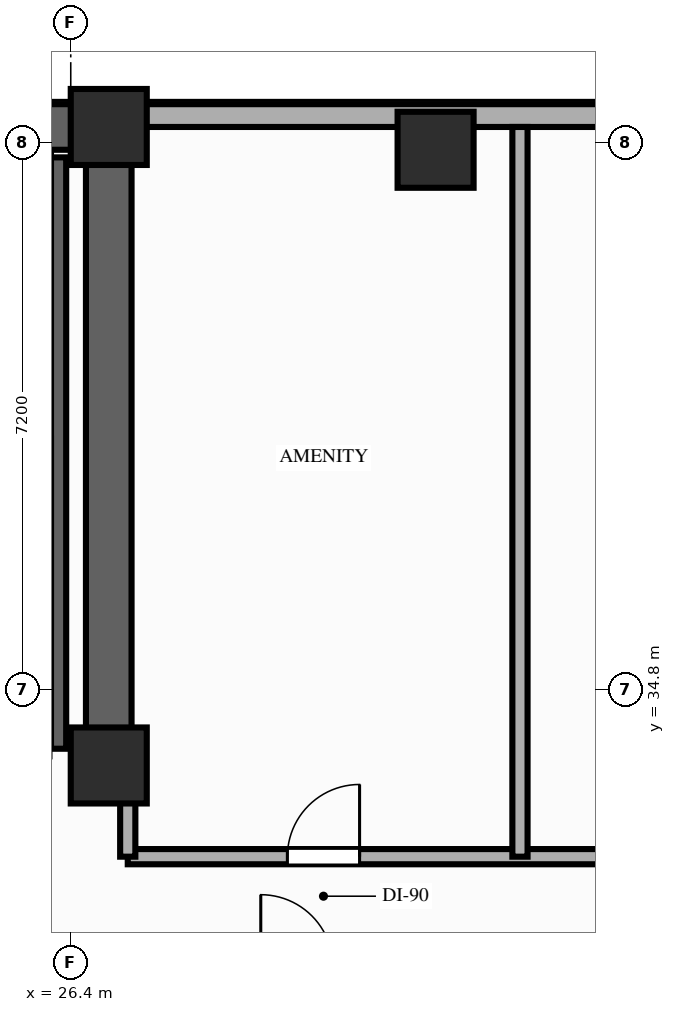
"""IFC4 building model, lengths in metres.
Left out: names, types, materials, properties, quantities, classifications, styles, units other than length and angle.
Written with IfcOpenShell. Run it as: python <this file> out.ifc"""

import sys

from ifc_helpers import new_model, si_unit, direction, frame, frame_2d, origin, origin_2d, place, context, subcontext, project, spatial, rectangle, extrude, element, fill, save


model = new_model("IFC4")
c1 = context("Model", 3, precision=1e-05, world=origin(), true_north=direction((0.0, 1.0)))
c2 = subcontext(c1, "Body", "Model", "MODEL_VIEW")
j1 = project(units=[si_unit("LENGTHUNIT", "METRE"), si_unit("PLANEANGLEUNIT", "RADIAN")], contexts=[c1])
p1 = place(None, origin())
s1 = spatial("IfcSite", under=j1, at=p1, CompositionType="ELEMENT")
p2 = place(p1, origin())
s2 = spatial("IfcBuilding", under=s1, at=p2, CompositionType="ELEMENT")
p3 = place(p2, frame((0.0, 0.0, 123.4)))
s3 = spatial("IfcBuildingStorey", under=s2, at=p3, CompositionType="ELEMENT", Elevation=123.4)
for number, where, z_axis, x_axis in (
    (1, (26.9, 33.8, 0.0), (0.0, 0.0, 1.0), (1.0, 0.0, 0.0)),
    (2, (26.9, 42.2, 0.0), (0.0, 0.0, 1.0), (1.0, 0.0, 0.0)),
    (3, (31.2, 41.9, 0.0), (0.0, 0.0, 1.0), (1.0, 0.0, 0.0)),
):
    element("IfcColumn", number, at=place(p3, frame(where, z_axis=z_axis, x_axis=x_axis)), inside=s3, PredefinedType="COLUMN", context=c2, shape_type="SweptSolid", body=[
        extrude(rectangle(XDim=1.0, YDim=1.0, at=origin_2d()), origin(), (0.0, 0.0, 1.0), 3.2),
    ])
p4 = place(p3, frame((46.4, 42.35, 0.0), z_axis=(0.0, 0.0, 1.0), x_axis=(-1.0, 0.0, 0.0)))
e4 = element("IfcWall", 4, at=p4, inside=s3, PredefinedType="STANDARD", context=c2, shape_type="SweptSolid", body=[
    extrude(rectangle(XDim=19.05, YDim=0.3, at=frame_2d((9.525, 0.0))), origin(), (0.0, 0.0, 1.0), 2.45),
])
p5 = place(p4, frame((8.79, 0.0, 0.85)))
e5 = element("IfcOpeningElement", 5, at=p5, cuts=e4, PredefinedType="OPENING", context=c2, shape_type="SweptSolid", body=[
    extrude(rectangle(XDim=1.8, YDim=1.35, at=frame_2d((0.9, 0.675))), frame((0.0, 0.16, 0.0), z_axis=(0.0, -1.0, 0.0), x_axis=(1.0, 0.0, 0.0)), (0.0, 0.0, 1.0), 0.32),
])
p6 = place(p3, frame((6.45, 42.2, 0.0), z_axis=(0.0, 0.0, 1.0), x_axis=(1.0, 0.0, 0.0)))
e6 = element("IfcWall", 6, at=p6, inside=s3, PredefinedType="SHEAR", context=c2, shape_type="SweptSolid", body=[
    extrude(rectangle(XDim=20.45, YDim=0.6, at=frame_2d((10.225, 0.0))), origin(), (0.0, 0.0, 1.0), 3.02),
])
p7 = place(p3, frame((26.9, 33.8, 0.0), z_axis=(0.0, 0.0, 1.0), x_axis=(0.0, 1.0, 0.0)))
e7 = element("IfcWall", 7, at=p7, inside=s3, PredefinedType="SHEAR", context=c2, shape_type="SweptSolid", body=[
    extrude(rectangle(XDim=7.95, YDim=0.6, at=frame_2d((3.975, 0.0))), origin(), (0.0, 0.0, 1.0), 3.02),
])
p8 = place(p3, frame((26.24, 34.02, 0.0), z_axis=(0.0, 0.0, 1.0), x_axis=(0.0, 1.0, 0.0)))
e8 = element("IfcWall", 8, at=p8, inside=s3, PredefinedType="SHEAR", context=c2, shape_type="SweptSolid", body=[
    extrude(rectangle(XDim=7.78, YDim=0.2, at=frame_2d((3.89, 0.0))), origin(), (0.0, 0.0, 1.0), 3.02),
])
p9 = place(p3, frame((27.15, 32.6, 0.0), z_axis=(0.0, 0.0, 1.0), x_axis=(1.0, 0.0, 0.0)))
e9 = element("IfcWall", 9, at=p9, inside=s3, PredefinedType="PARTITIONING", context=c2, shape_type="SweptSolid", body=[
    extrude(rectangle(XDim=13.95, YDim=0.2, at=frame_2d((6.975, 0.0))), origin(), (0.0, 0.0, 1.0), 2.45),
])
p10 = place(p9, frame((2.1, 0.0, 0.0)))
e10 = element("IfcOpeningElement", 10, at=p10, cuts=e9, PredefinedType="OPENING", context=c2, shape_type="SweptSolid", body=[
    extrude(rectangle(XDim=0.95, YDim=2.15, at=frame_2d((0.475, 1.075))), frame((0.0, 0.11, 0.0), z_axis=(0.0, -1.0, 0.0), x_axis=(1.0, 0.0, 0.0)), (0.0, 0.0, 1.0), 0.22),
])
p11 = place(p9, frame((9.07, 0.0, 0.0)))
e11 = element("IfcOpeningElement", 11, at=p11, cuts=e9, PredefinedType="OPENING", context=c2, shape_type="SweptSolid", body=[
    extrude(rectangle(XDim=0.95, YDim=2.15, at=frame_2d((0.475, 1.075))), frame((0.0, 0.11, 0.0), z_axis=(0.0, -1.0, 0.0), x_axis=(1.0, 0.0, 0.0)), (0.0, 0.0, 1.0), 0.22),
])
p12 = place(p3, frame((27.15, 32.6, 0.0), z_axis=(0.0, 0.0, 1.0), x_axis=(0.0, 1.0, 0.0)))
e12 = element("IfcWall", 12, at=p12, inside=s3, PredefinedType="PARTITIONING", context=c2, shape_type="SweptSolid", body=[
    extrude(rectangle(XDim=1.08, YDim=0.2, at=frame_2d((0.54, 0.0))), origin(), (0.0, 0.0, 1.0), 2.45),
])
p13 = place(p3, frame((32.31, 32.6, 0.0), z_axis=(0.0, 0.0, 1.0), x_axis=(0.0, 1.0, 0.0)))
e13 = element("IfcWall", 13, at=p13, inside=s3, PredefinedType="PARTITIONING", context=c2, shape_type="SweptSolid", body=[
    extrude(rectangle(XDim=9.6, YDim=0.2, at=frame_2d((4.8, 0.0))), origin(), (0.0, 0.0, 1.0), 2.45),
])
p14 = place(p10, origin())
e14 = element("IfcDoor", 14, at=p14, inside=s3, OperationType="SINGLE_SWING_RIGHT", PredefinedType="DOOR", context=c2, shape_type="SweptSolid", body=[
    extrude(rectangle(XDim=0.95, YDim=2.15, at=frame_2d((0.475, 1.075))), frame((0.0, 0.025, 0.0), z_axis=(0.0, -1.0, 0.0), x_axis=(1.0, 0.0, 0.0)), (0.0, 0.0, 1.0), 0.05),
])
fill(e10, e14)
save(model, sys.argv[1])
